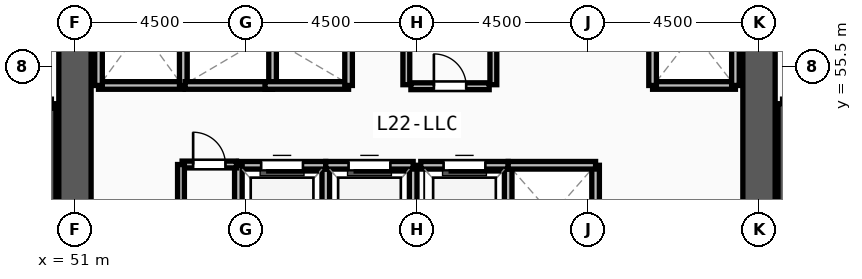
"""IFC4 building model, lengths in metres.
Left out: names, types, materials, properties, quantities, classifications, styles, units other than length and angle.
Written with IfcOpenShell. Run it as: python <this file> out.ifc"""

import sys

from ifc_helpers import new_model, si_unit, direction, frame, frame_2d, origin, place, context, subcontext, project, spatial, rectangle, extrude, source, transform, mapped, element, fill, save


model = new_model("IFC4")
c1 = context("Model", 3, precision=1e-05, world=origin(), true_north=direction((0.0, 1.0)))
c2 = subcontext(c1, "Body", "Model", "MODEL_VIEW")
j1 = project(units=[si_unit("LENGTHUNIT", "METRE"), si_unit("PLANEANGLEUNIT", "RADIAN")], contexts=[c1])
p1 = place(None, origin())
s1 = spatial("IfcSite", under=j1, at=p1, CompositionType="ELEMENT")
p2 = place(p1, origin())
s2 = spatial("IfcBuilding", under=s1, at=p2, CompositionType="ELEMENT")
p3 = place(p2, frame((0.0, 0.0, 85.5)))
s3 = spatial("IfcBuildingStorey", under=s2, at=p3, CompositionType="ELEMENT", Elevation=85.5)
p4 = place(p3, frame((69.0, 60.675, 0.0), z_axis=(0.0, 0.0, 1.0), x_axis=(0.0, -1.0, 0.0)))
e1 = element("IfcWall", 1, at=p4, inside=s3, PredefinedType="SHEAR", context=c2, shape_type="SweptSolid", body=[
    extrude(rectangle(XDim=13.35, YDim=0.85, at=frame_2d((6.675, 0.0))), origin(), (0.0, 0.0, 1.0), 3.57),
])
m1 = source(origin(), c2, "Body", "SweptSolid", [
    extrude(rectangle(XDim=1.2, YDim=2.2, at=frame_2d((0.6, 1.1))), frame((0.0, 0.435, 0.0), z_axis=(0.0, -1.0, 0.0), x_axis=(1.0, 0.0, 0.0)), (0.0, 0.0, 1.0), 0.87),
])
p5 = place(p4, frame((1.125, 0.0, 0.0)))
e2 = element("IfcOpeningElement", 2, at=p5, cuts=e1, PredefinedType="OPENING", context=c2, shape_type="MappedRepresentation", body=[
    mapped(m1, transform((0.0, 0.0, 0.0), x_axis=(1.0, 0.0, 0.0), y_axis=(0.0, 1.0, 0.0), z_axis=(0.0, 0.0, 1.0), scale=1.0)),
])
p6 = place(p3, frame((51.0, 47.325, 0.0), z_axis=(0.0, 0.0, 1.0), x_axis=(0.0, 1.0, 0.0)))
e3 = element("IfcWall", 3, at=p6, inside=s3, PredefinedType="SHEAR", context=c2, shape_type="SweptSolid", body=[
    extrude(rectangle(XDim=13.35, YDim=0.85, at=frame_2d((6.675, 0.0))), origin(), (0.0, 0.0, 1.0), 3.57),
])
for number, where, z_axis, x_axis in (
    (4, (50.38, 46.7, 0.0), (0.0, 0.0, 1.0), (0.0, 1.0, 0.0)),
    (5, (69.62, 54.52, 0.0), (0.0, 0.0, 1.0), (0.0, -1.0, 0.0)),
):
    element("IfcWall", number, at=place(p3, frame(where, z_axis=z_axis, x_axis=x_axis)), inside=s3, PredefinedType="SOLIDWALL", context=c2, shape_type="SweptSolid", body=[
        extrude(rectangle(XDim=7.82, YDim=0.24, at=frame_2d((3.91, 0.0))), origin(), (0.0, 0.0, 1.0), 3.57),
    ])
p7 = place(p3, frame((51.62, 55.0, 0.0), z_axis=(0.0, 0.0, 1.0), x_axis=(1.0, 0.0, 0.0)))
e6 = element("IfcWall", 6, at=p7, inside=s3, PredefinedType="SOLIDWALL", context=c2, shape_type="SweptSolid", body=[
    extrude(rectangle(XDim=2.23, YDim=0.2, at=frame_2d((1.115, 0.0))), origin(), (0.0, 0.0, 1.0), 3.57),
])
for number, where, z_axis, x_axis in (
    (7, (53.85, 55.0, 0.0), (0.0, 0.0, 1.0), (0.0, 1.0, 0.0)),
    (8, (51.62, 58.0, 0.0), (0.0, 0.0, 1.0), (0.0, -1.0, 0.0)),
):
    element("IfcWall", number, at=place(p3, frame(where, z_axis=z_axis, x_axis=x_axis)), inside=s3, PredefinedType="SOLIDWALL", context=c2, shape_type="SweptSolid", body=[
        extrude(rectangle(XDim=3.0, YDim=0.2, at=frame_2d((1.5, 0.0))), origin(), (0.0, 0.0, 1.0), 3.57),
    ])
p8 = place(p3, frame((66.2, 55.0, 0.0), z_axis=(0.0, 0.0, 1.0), x_axis=(1.0, 0.0, 0.0)))
e9 = element("IfcWall", 9, at=p8, inside=s3, PredefinedType="SOLIDWALL", context=c2, shape_type="SweptSolid", body=[
    extrude(rectangle(XDim=2.18, YDim=0.2, at=frame_2d((1.09, 0.0))), origin(), (0.0, 0.0, 1.0), 3.57),
])
for number, where, z_axis, x_axis in (
    (10, (68.38, 55.0, 0.0), (0.0, 0.0, 1.0), (0.0, 1.0, 0.0)),
    (11, (66.2, 57.75, 0.0), (0.0, 0.0, 1.0), (0.0, -1.0, 0.0)),
):
    element("IfcWall", number, at=place(p3, frame(where, z_axis=z_axis, x_axis=x_axis)), inside=s3, PredefinedType="SOLIDWALL", context=c2, shape_type="SweptSolid", body=[
        extrude(rectangle(XDim=2.75, YDim=0.2, at=frame_2d((1.375, 0.0))), origin(), (0.0, 0.0, 1.0), 3.57),
    ])
p9 = place(p3, frame((57.6, 50.3, 0.0), z_axis=(0.0, 0.0, 1.0), x_axis=(0.0, 1.0, 0.0)))
e12 = element("IfcWall", 12, at=p9, inside=s3, PredefinedType="SOLIDWALL", context=c2, shape_type="SweptSolid", body=[
    extrude(rectangle(XDim=2.6, YDim=0.2, at=frame_2d((1.3, 0.0))), origin(), (0.0, 0.0, 1.0), 3.57),
])
p10 = place(p3, frame((57.6, 52.9, 0.0), z_axis=(0.0, 0.0, 1.0), x_axis=(-1.0, 0.0, 0.0)))
e13 = element("IfcWall", 13, at=p10, inside=s3, PredefinedType="SOLIDWALL", context=c2, shape_type="SweptSolid", body=[
    extrude(rectangle(XDim=2.3, YDim=0.2, at=frame_2d((1.15, 0.0))), origin(), (0.0, 0.0, 1.0), 3.57),
])
m2 = source(origin(), c2, "Body", "SweptSolid", [
    extrude(rectangle(XDim=1.1, YDim=2.2, at=frame_2d((0.55, 1.1))), frame((0.0, 0.11, 0.0), z_axis=(0.0, -1.0, 0.0), x_axis=(1.0, 0.0, 0.0)), (0.0, 0.0, 1.0), 0.22),
])
p11 = place(p10, frame((0.6, 0.0, 0.0)))
e14 = element("IfcOpeningElement", 14, at=p11, cuts=e13, PredefinedType="OPENING", context=c2, shape_type="MappedRepresentation", body=[
    mapped(m2, transform((0.0, 0.0, 0.0), x_axis=(1.0, 0.0, 0.0), y_axis=(0.0, 1.0, 0.0), z_axis=(0.0, 0.0, 1.0), scale=1.0)),
])
for number, where, z_axis, x_axis in (
    (15, (55.3, 52.9, 0.0), (0.0, 0.0, 1.0), (0.0, -1.0, 0.0)),
    (16, (59.9, 50.3, 0.0), (0.0, 0.0, 1.0), (0.0, 1.0, 0.0)),
):
    element("IfcWall", number, at=place(p3, frame(where, z_axis=z_axis, x_axis=x_axis)), inside=s3, PredefinedType="SOLIDWALL", context=c2, shape_type="SweptSolid", body=[
        extrude(rectangle(XDim=2.6, YDim=0.2, at=frame_2d((1.3, 0.0))), origin(), (0.0, 0.0, 1.0), 3.57),
    ])
p12 = place(p3, frame((59.9, 52.9, 0.0), z_axis=(0.0, 0.0, 1.0), x_axis=(-1.0, 0.0, 0.0)))
e17 = element("IfcWall", 17, at=p12, inside=s3, PredefinedType="SOLIDWALL", context=c2, shape_type="SweptSolid", body=[
    extrude(rectangle(XDim=2.3, YDim=0.2, at=frame_2d((1.15, 0.0))), origin(), (0.0, 0.0, 1.0), 3.57),
])
p13 = place(p12, frame((0.6, 0.0, 0.0)))
e18 = element("IfcOpeningElement", 18, at=p13, cuts=e17, PredefinedType="OPENING", context=c2, shape_type="MappedRepresentation", body=[
    mapped(m2, transform((0.0, 0.0, 0.0), x_axis=(1.0, 0.0, 0.0), y_axis=(0.0, 1.0, 0.0), z_axis=(0.0, 0.0, 1.0), scale=1.0)),
])
p14 = place(p3, frame((62.4, 50.3, 0.0), z_axis=(0.0, 0.0, 1.0), x_axis=(0.0, 1.0, 0.0)))
e19 = element("IfcWall", 19, at=p14, inside=s3, PredefinedType="SOLIDWALL", context=c2, shape_type="SweptSolid", body=[
    extrude(rectangle(XDim=2.6, YDim=0.2, at=frame_2d((1.3, 0.0))), origin(), (0.0, 0.0, 1.0), 3.57),
])
p15 = place(p3, frame((62.4, 52.9, 0.0), z_axis=(0.0, 0.0, 1.0), x_axis=(-1.0, 0.0, 0.0)))
e20 = element("IfcWall", 20, at=p15, inside=s3, PredefinedType="SOLIDWALL", context=c2, shape_type="SweptSolid", body=[
    extrude(rectangle(XDim=2.3, YDim=0.2, at=frame_2d((1.15, 0.0))), origin(), (0.0, 0.0, 1.0), 3.57),
])
p16 = place(p15, frame((0.6, 0.0, 0.0)))
e21 = element("IfcOpeningElement", 21, at=p16, cuts=e20, PredefinedType="OPENING", context=c2, shape_type="MappedRepresentation", body=[
    mapped(m2, transform((0.0, 0.0, 0.0), x_axis=(1.0, 0.0, 0.0), y_axis=(0.0, 1.0, 0.0), z_axis=(0.0, 0.0, 1.0), scale=1.0)),
])
p17 = place(p3, frame((64.7, 50.3, 0.0), z_axis=(0.0, 0.0, 1.0), x_axis=(0.0, 1.0, 0.0)))
e22 = element("IfcWall", 22, at=p17, inside=s3, PredefinedType="SOLIDWALL", context=c2, shape_type="SweptSolid", body=[
    extrude(rectangle(XDim=2.6, YDim=0.2, at=frame_2d((1.3, 0.0))), origin(), (0.0, 0.0, 1.0), 3.57),
])
for number, where, z_axis, x_axis in (
    (23, (64.7, 52.9, 0.0), (0.0, 0.0, 1.0), (-1.0, 0.0, 0.0)),
    (24, (53.9, 55.0, 0.0), (0.0, 0.0, 1.0), (1.0, 0.0, 0.0)),
):
    element("IfcWall", number, at=place(p3, frame(where, z_axis=z_axis, x_axis=x_axis)), inside=s3, PredefinedType="SOLIDWALL", context=c2, shape_type="SweptSolid", body=[
        extrude(rectangle(XDim=2.3, YDim=0.2, at=frame_2d((1.15, 0.0))), origin(), (0.0, 0.0, 1.0), 3.57),
    ])
p18 = place(p3, frame((56.2, 55.0, 0.0), z_axis=(0.0, 0.0, 1.0), x_axis=(0.0, 1.0, 0.0)))
e25 = element("IfcWall", 25, at=p18, inside=s3, PredefinedType="SOLIDWALL", context=c2, shape_type="SweptSolid", body=[
    extrude(rectangle(XDim=2.6, YDim=0.2, at=frame_2d((1.3, 0.0))), origin(), (0.0, 0.0, 1.0), 3.57),
])
p19 = place(p3, frame((56.0, 55.0, 0.0), z_axis=(0.0, 0.0, 1.0), x_axis=(1.0, 0.0, 0.0)))
e26 = element("IfcWall", 26, at=p19, inside=s3, PredefinedType="SOLIDWALL", context=c2, shape_type="SweptSolid", body=[
    extrude(rectangle(XDim=2.2, YDim=0.2, at=frame_2d((1.1, 0.0))), origin(), (0.0, 0.0, 1.0), 3.57),
])
p20 = place(p3, frame((58.2, 55.0, 0.0), z_axis=(0.0, 0.0, 1.0), x_axis=(0.0, 1.0, 0.0)))
e27 = element("IfcWall", 27, at=p20, inside=s3, PredefinedType="SOLIDWALL", context=c2, shape_type="SweptSolid", body=[
    extrude(rectangle(XDim=2.6, YDim=0.2, at=frame_2d((1.3, 0.0))), origin(), (0.0, 0.0, 1.0), 3.57),
])
p21 = place(p3, frame((59.84, 54.98, 0.0), z_axis=(0.0, 0.0, 1.0), x_axis=(1.0, 0.0, 0.0)))
e28 = element("IfcWall", 28, at=p21, inside=s3, PredefinedType="PARTITIONING", context=c2, shape_type="SweptSolid", body=[
    extrude(rectangle(XDim=2.06, YDim=0.18, at=frame_2d((1.03, 0.0))), origin(), (0.0, 0.0, 1.0), 3.57),
])
m3 = source(origin(), c2, "Body", "SweptSolid", [
    extrude(rectangle(XDim=0.85, YDim=2.1, at=frame_2d((0.425, 1.05))), frame((0.0, 0.1, 0.0), z_axis=(0.0, -1.0, 0.0), x_axis=(1.0, 0.0, 0.0)), (0.0, 0.0, 1.0), 0.2),
])
p22 = place(p21, frame((0.605, 0.0, 0.0)))
e29 = element("IfcOpeningElement", 29, at=p22, cuts=e28, PredefinedType="OPENING", context=c2, shape_type="MappedRepresentation", body=[
    mapped(m3, transform((0.0, 0.0, 0.0), x_axis=(1.0, 0.0, 0.0), y_axis=(0.0, 1.0, 0.0), z_axis=(0.0, 0.0, 1.0), scale=1.0)),
])
p23 = place(p3, frame((53.82, 52.92, 0.0), z_axis=(0.0, 0.0, 1.0), x_axis=(1.0, 0.0, 0.0)))
e30 = element("IfcWall", 30, at=p23, inside=s3, PredefinedType="PARTITIONING", context=c2, shape_type="SweptSolid", body=[
    extrude(rectangle(XDim=1.43, YDim=0.18, at=frame_2d((0.715, 0.0))), origin(), (0.0, 0.0, 1.0), 3.57),
])
p24 = place(p23, frame((0.29, 0.0, 0.0)))
e31 = element("IfcOpeningElement", 31, at=p24, cuts=e30, PredefinedType="OPENING", context=c2, shape_type="MappedRepresentation", body=[
    mapped(m3, transform((0.0, 0.0, 0.0), x_axis=(1.0, 0.0, 0.0), y_axis=(0.0, 1.0, 0.0), z_axis=(0.0, 0.0, 1.0), scale=1.0)),
])
for number, where, z_axis, x_axis in (
    (32, (59.72, 55.02, 0.0), (0.0, 0.0, 1.0), (0.0, 1.0, 0.0)),
    (33, (62.01, 55.02, 0.0), (0.0, 0.0, 1.0), (0.0, 1.0, 0.0)),
):
    element("IfcWall", number, at=place(p3, frame(where, z_axis=z_axis, x_axis=x_axis)), inside=s3, PredefinedType="PARTITIONING", context=c2, shape_type="SweptSolid", body=[
        extrude(rectangle(XDim=2.88, YDim=0.18, at=frame_2d((1.44, 0.0))), origin(), (0.0, 0.0, 1.0), 3.57),
    ])
p25 = place(p3, frame((53.79, 50.35, 0.0), z_axis=(0.0, 0.0, 1.0), x_axis=(0.0, 1.0, 0.0)))
e34 = element("IfcWall", 34, at=p25, inside=s3, PredefinedType="PARTITIONING", context=c2, shape_type="SweptSolid", body=[
    extrude(rectangle(XDim=2.57, YDim=0.18, at=frame_2d((1.285, 0.0))), origin(), (0.0, 0.0, 1.0), 3.57),
])
m4 = source(origin(), c2, "Body", "SweptSolid", [
    extrude(rectangle(XDim=1.1, YDim=2.2, at=frame_2d((0.55, 1.1))), frame((0.0, 0.025, 0.0), z_axis=(0.0, -1.0, 0.0), x_axis=(1.0, 0.0, 0.0)), (0.0, 0.0, 1.0), 0.05),
])
p26 = place(p11, origin())
e35 = element("IfcDoor", 35, at=p26, inside=s3, OperationType="SLIDING_TO_LEFT", PredefinedType="DOOR", context=c2, shape_type="MappedRepresentation", body=[
    mapped(m4, transform((0.0, 0.0, 0.0), x_axis=(1.0, 0.0, 0.0), y_axis=(0.0, 1.0, 0.0), z_axis=(0.0, 0.0, 1.0), scale=1.0)),
])
fill(e14, e35)
p27 = place(p13, origin())
e36 = element("IfcDoor", 36, at=p27, inside=s3, OperationType="SLIDING_TO_LEFT", PredefinedType="DOOR", context=c2, shape_type="MappedRepresentation", body=[
    mapped(m4, transform((0.0, 0.0, 0.0), x_axis=(1.0, 0.0, 0.0), y_axis=(0.0, 1.0, 0.0), z_axis=(0.0, 0.0, 1.0), scale=1.0)),
])
fill(e18, e36)
p28 = place(p16, origin())
e37 = element("IfcDoor", 37, at=p28, inside=s3, OperationType="SLIDING_TO_LEFT", PredefinedType="DOOR", context=c2, shape_type="MappedRepresentation", body=[
    mapped(m4, transform((0.0, 0.0, 0.0), x_axis=(1.0, 0.0, 0.0), y_axis=(0.0, 1.0, 0.0), z_axis=(0.0, 0.0, 1.0), scale=1.0)),
])
fill(e21, e37)
m5 = source(origin(), c2, "Body", "SweptSolid", [
    extrude(rectangle(XDim=0.85, YDim=2.1, at=frame_2d((0.425, 1.05))), frame((0.0, 0.025, 0.0), z_axis=(0.0, -1.0, 0.0), x_axis=(1.0, 0.0, 0.0)), (0.0, 0.0, 1.0), 0.05),
])
p29 = place(p22, origin())
e38 = element("IfcDoor", 38, at=p29, inside=s3, OperationType="SINGLE_SWING_LEFT", PredefinedType="DOOR", context=c2, shape_type="MappedRepresentation", body=[
    mapped(m5, transform((0.0, 0.0, 0.0), x_axis=(1.0, 0.0, 0.0), y_axis=(0.0, 1.0, 0.0), z_axis=(0.0, 0.0, 1.0), scale=1.0)),
])
fill(e29, e38)
p30 = place(p24, origin())
e39 = element("IfcDoor", 39, at=p30, inside=s3, OperationType="SINGLE_SWING_LEFT", PredefinedType="DOOR", context=c2, shape_type="MappedRepresentation", body=[
    mapped(m5, transform((0.0, 0.0, 0.0), x_axis=(1.0, 0.0, 0.0), y_axis=(0.0, 1.0, 0.0), z_axis=(0.0, 0.0, 1.0), scale=1.0)),
])
fill(e31, e39)
save(model, sys.argv[1])
